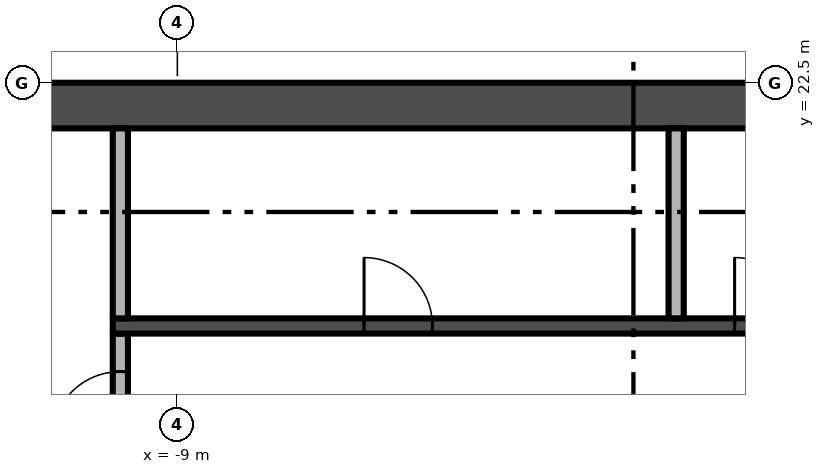
"""IFC4 building model, lengths in metres.
Left out: names, types, materials, properties, quantities, classifications, styles, units other than length and angle.
Written with IfcOpenShell. Run it as: python <this file> out.ifc"""

import sys

from ifc_helpers import new_model, si_unit, direction, frame, frame_2d, origin, place, context, subcontext, project, spatial, rectangle, extrude, element, fill, save


model = new_model("IFC4")
c1 = context("Model", 3, precision=1e-05, world=origin(), true_north=direction((0.0, 1.0)))
c2 = subcontext(c1, "Body", "Model", "MODEL_VIEW")
j1 = project(units=[si_unit("LENGTHUNIT", "METRE"), si_unit("PLANEANGLEUNIT", "RADIAN")], contexts=[c1])
p1 = place(None, origin())
s1 = spatial("IfcSite", under=j1, at=p1, CompositionType="ELEMENT")
p2 = place(p1, origin())
s2 = spatial("IfcBuilding", under=s1, at=p2, CompositionType="ELEMENT")
p3 = place(p2, frame((0.0, 0.0, 218.6)))
s3 = spatial("IfcBuildingStorey", under=s2, at=p3, CompositionType="ELEMENT", Elevation=218.6)
p4 = place(p3, frame((13.5, 22.2, -0.3), z_axis=(0.0, 0.0, 1.0), x_axis=(-1.0, 0.0, 0.0)))
e1 = element("IfcWall", 1, at=p4, inside=s3, PredefinedType="SHEAR", context=c2, shape_type="SweptSolid", body=[
    extrude(rectangle(XDim=27.0, YDim=0.6, at=frame_2d((13.5, 0.0))), origin(), (0.0, 0.0, 1.0), 3.8),
])
p5 = place(p3, frame((-9.75, 17.8, 0.0), z_axis=(0.0, 0.0, 1.0), x_axis=(0.0, 1.0, 0.0)))
e2 = element("IfcWall", 2, at=p5, inside=s3, PredefinedType="PARTITIONING", context=c2, shape_type="SweptSolid", body=[
    extrude(rectangle(XDim=1.4, YDim=0.2, at=frame_2d((0.7, 0.0))), origin(), (0.0, 0.0, 1.0), 3.5),
])
p6 = place(p5, origin())
e3 = element("IfcOpeningElement", 3, at=p6, cuts=e2, PredefinedType="OPENING", context=c2, shape_type="SweptSolid", body=[
    extrude(rectangle(XDim=0.9, YDim=2.1, at=frame_2d((0.45, 1.05))), frame((0.0, 0.11, 0.0), z_axis=(0.0, -1.0, 0.0), x_axis=(1.0, 0.0, 0.0)), (0.0, 0.0, 1.0), 0.22),
])
p7 = place(p3, frame((-9.85, 19.3, 0.0), z_axis=(0.0, 0.0, 1.0), x_axis=(1.0, 0.0, 0.0)))
e4 = element("IfcWall", 4, at=p7, inside=s3, PredefinedType="SHEAR", context=c2, shape_type="SweptSolid", body=[
    extrude(rectangle(XDim=19.7, YDim=0.2, at=frame_2d((9.85, 0.0))), origin(), (0.0, 0.0, 1.0), 3.5),
])
p8 = place(p7, frame((10.519, 0.0, 0.0)))
e5 = element("IfcOpeningElement", 5, at=p8, cuts=e4, PredefinedType="OPENING", context=c2, shape_type="SweptSolid", body=[
    extrude(rectangle(XDim=1.1, YDim=2.1, at=frame_2d((0.55, 1.05))), frame((0.0, 0.11, 0.0), z_axis=(0.0, -1.0, 0.0), x_axis=(1.0, 0.0, 0.0)), (0.0, 0.0, 1.0), 0.22),
])
p9 = place(p7, frame((12.956, 0.0, 0.0)))
e6 = element("IfcOpeningElement", 6, at=p9, cuts=e4, PredefinedType="OPENING", context=c2, shape_type="SweptSolid", body=[
    extrude(rectangle(XDim=1.1, YDim=2.1, at=frame_2d((0.55, 1.05))), frame((0.0, 0.11, 0.0), z_axis=(0.0, -1.0, 0.0), x_axis=(1.0, 0.0, 0.0)), (0.0, 0.0, 1.0), 0.22),
])
p10 = place(p7, frame((15.394, 0.0, 0.0)))
e7 = element("IfcOpeningElement", 7, at=p10, cuts=e4, PredefinedType="OPENING", context=c2, shape_type="SweptSolid", body=[
    extrude(rectangle(XDim=1.1, YDim=2.1, at=frame_2d((0.55, 1.05))), frame((0.0, 0.11, 0.0), z_axis=(0.0, -1.0, 0.0), x_axis=(1.0, 0.0, 0.0)), (0.0, 0.0, 1.0), 0.22),
])
p11 = place(p7, frame((17.831, 0.0, 0.0)))
e8 = element("IfcOpeningElement", 8, at=p11, cuts=e4, PredefinedType="OPENING", context=c2, shape_type="SweptSolid", body=[
    extrude(rectangle(XDim=1.1, YDim=2.1, at=frame_2d((0.55, 1.05))), frame((0.0, 0.11, 0.0), z_axis=(0.0, -1.0, 0.0), x_axis=(1.0, 0.0, 0.0)), (0.0, 0.0, 1.0), 0.22),
])
p12 = place(p7, frame((3.306, 0.0, 0.0)))
e9 = element("IfcOpeningElement", 9, at=p12, cuts=e4, PredefinedType="OPENING", context=c2, shape_type="SweptSolid", body=[
    extrude(rectangle(XDim=0.9, YDim=2.1, at=frame_2d((0.45, 1.05))), frame((0.0, 0.11, 0.0), z_axis=(0.0, -1.0, 0.0), x_axis=(1.0, 0.0, 0.0)), (0.0, 0.0, 1.0), 0.22),
])
p13 = place(p7, frame((8.181, 0.0, 0.0)))
e10 = element("IfcOpeningElement", 10, at=p13, cuts=e4, PredefinedType="OPENING", context=c2, shape_type="SweptSolid", body=[
    extrude(rectangle(XDim=0.9, YDim=2.1, at=frame_2d((0.45, 1.05))), frame((0.0, 0.11, 0.0), z_axis=(0.0, -1.0, 0.0), x_axis=(1.0, 0.0, 0.0)), (0.0, 0.0, 1.0), 0.22),
])
for number, where, z_axis, x_axis in (
    (11, (-9.75, 19.4, 0.0), (0.0, 0.0, 1.0), (0.0, 1.0, 0.0)),
    (12, (-2.438, 19.4, 0.0), (0.0, 0.0, 1.0), (0.0, 1.0, 0.0)),
):
    element("IfcWall", number, at=place(p3, frame(where, z_axis=z_axis, x_axis=x_axis)), inside=s3, PredefinedType="PARTITIONING", context=c2, shape_type="SweptSolid", body=[
        extrude(rectangle(XDim=2.5, YDim=0.2, at=frame_2d((1.25, 0.0))), origin(), (0.0, 0.0, 1.0), 3.5),
    ])
p14 = place(p6, origin())
e13 = element("IfcDoor", 13, at=p14, inside=s3, OperationType="SINGLE_SWING_LEFT", PredefinedType="DOOR", context=c2, shape_type="SweptSolid", body=[
    extrude(rectangle(XDim=0.9, YDim=2.1, at=frame_2d((0.45, 1.05))), frame((0.0, 0.025, 0.0), z_axis=(0.0, -1.0, 0.0), x_axis=(1.0, 0.0, 0.0)), (0.0, 0.0, 1.0), 0.05),
])
fill(e3, e13)
p15 = place(p12, origin())
e14 = element("IfcDoor", 14, at=p15, inside=s3, OperationType="SINGLE_SWING_LEFT", PredefinedType="DOOR", context=c2, shape_type="SweptSolid", body=[
    extrude(rectangle(XDim=0.9, YDim=2.1, at=frame_2d((0.45, 1.05))), frame((0.0, 0.025, 0.0), z_axis=(0.0, -1.0, 0.0), x_axis=(1.0, 0.0, 0.0)), (0.0, 0.0, 1.0), 0.05),
])
fill(e9, e14)
p16 = place(p13, origin())
e15 = element("IfcDoor", 15, at=p16, inside=s3, OperationType="SINGLE_SWING_LEFT", PredefinedType="DOOR", context=c2, shape_type="SweptSolid", body=[
    extrude(rectangle(XDim=0.9, YDim=2.1, at=frame_2d((0.45, 1.05))), frame((0.0, 0.025, 0.0), z_axis=(0.0, -1.0, 0.0), x_axis=(1.0, 0.0, 0.0)), (0.0, 0.0, 1.0), 0.05),
])
fill(e10, e15)
save(model, sys.argv[1])
